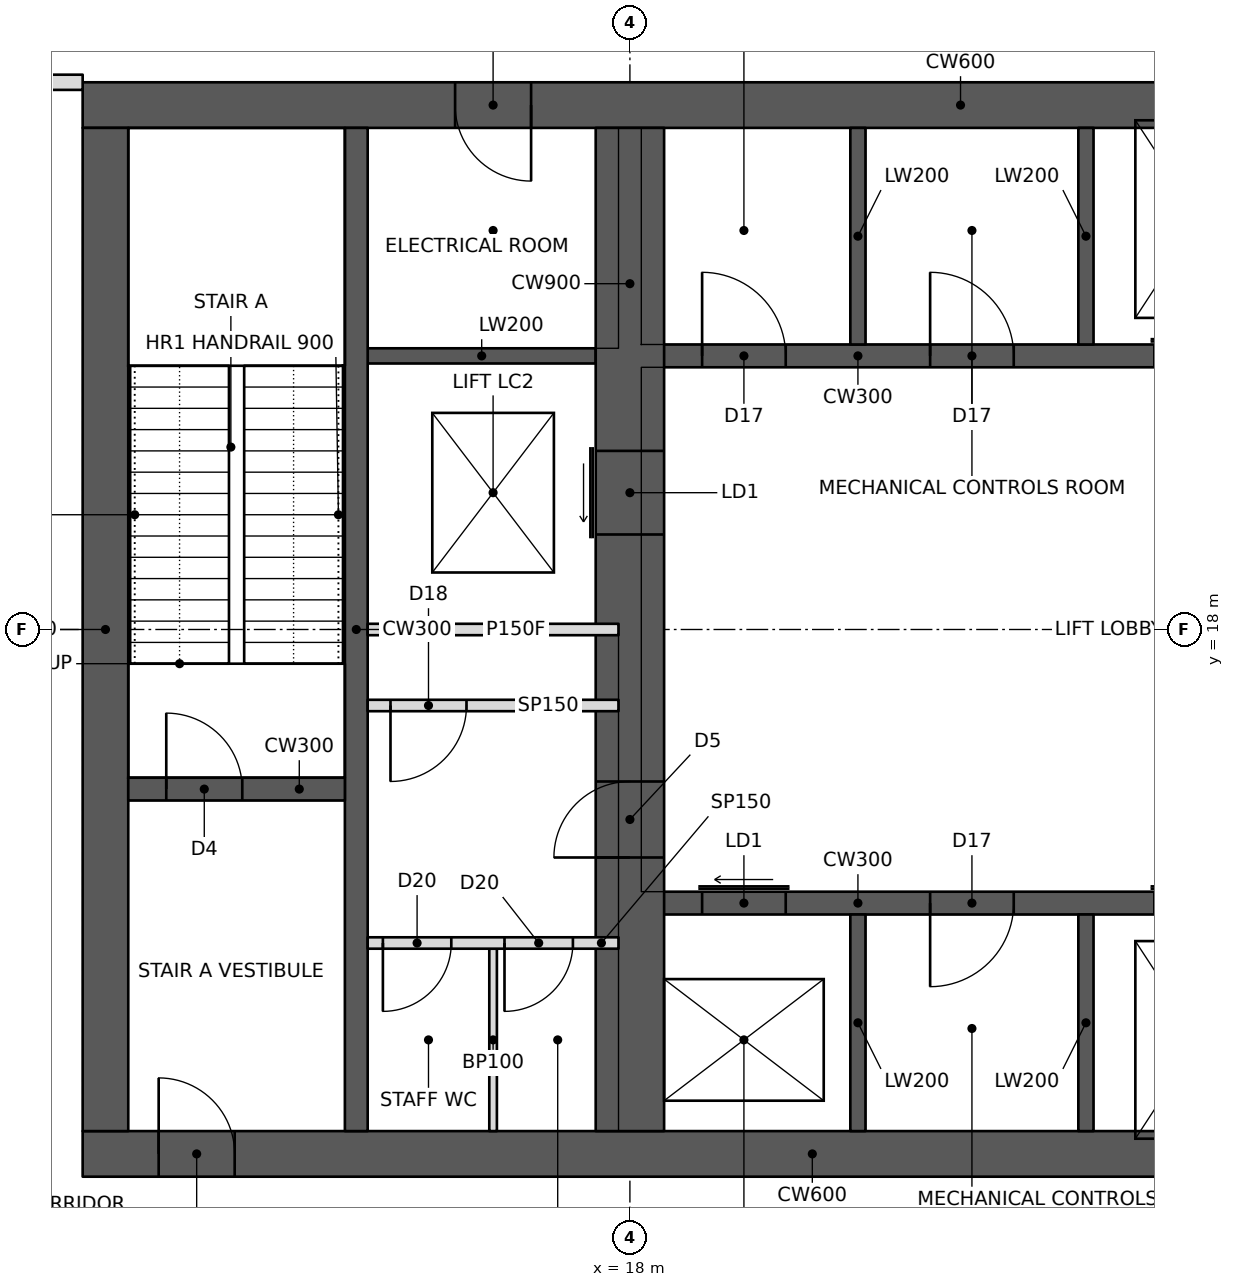
"""IFC4 building model, lengths in metres.
Left out: names, types, materials, properties, quantities, classifications, styles, units other than length and angle.
Written with IfcOpenShell. Run it as: python <this file> out.ifc"""

import sys

from ifc_helpers import new_model, si_unit, direction, frame, frame_2d, origin, place, context, subcontext, project, spatial, rectangle, extrude, element, fill, save


model = new_model("IFC4")
c1 = context("Model", 3, precision=1e-05, world=origin(), true_north=direction((0.0, 1.0)))
c2 = subcontext(c1, "Body", "Model", "MODEL_VIEW")
j1 = project(units=[si_unit("LENGTHUNIT", "METRE"), si_unit("PLANEANGLEUNIT", "RADIAN")], contexts=[c1])
p1 = place(None, origin())
s1 = spatial("IfcSite", under=j1, at=p1, CompositionType="ELEMENT")
p2 = place(p1, origin())
s2 = spatial("IfcBuilding", under=s1, at=p2, CompositionType="ELEMENT")
p3 = place(p2, frame((0.0, 0.0, 221.6)))
s3 = spatial("IfcBuildingStorey", under=s2, at=p3, CompositionType="ELEMENT", Elevation=221.6)
p4 = place(p3, frame((10.8, 11.1, 0.0), z_axis=(0.0, 0.0, 1.0), x_axis=(1.0, 0.0, 0.0)))
e1 = element("IfcWall", 1, at=p4, inside=s3, PredefinedType="SHEAR", context=c2, shape_type="SweptSolid", body=[
    extrude(rectangle(XDim=23.4, YDim=0.6, at=frame_2d((11.7, 0.0))), origin(), (0.0, 0.0, 1.0), 5.0),
])
p5 = place(p4, frame((1.0, 0.0, 0.0)))
e2 = element("IfcOpeningElement", 2, at=p5, cuts=e1, PredefinedType="OPENING", context=c2, shape_type="SweptSolid", body=[
    extrude(rectangle(XDim=1.0, YDim=2.1, at=frame_2d((0.5, 1.05))), frame((0.0, 0.31, 0.0), z_axis=(0.0, -1.0, 0.0), x_axis=(1.0, 0.0, 0.0)), (0.0, 0.0, 1.0), 0.62),
])
p6 = place(p4, frame((17.2, 0.0, 0.0)))
e3 = element("IfcOpeningElement", 3, at=p6, cuts=e1, PredefinedType="OPENING", context=c2, shape_type="SweptSolid", body=[
    extrude(rectangle(XDim=1.8, YDim=2.1, at=frame_2d((0.9, 1.05))), frame((0.0, 0.31, 0.0), z_axis=(0.0, -1.0, 0.0), x_axis=(1.0, 0.0, 0.0)), (0.0, 0.0, 1.0), 0.62),
])
p7 = place(p3, frame((10.8, 24.9, 0.0), z_axis=(0.0, 0.0, 1.0), x_axis=(1.0, 0.0, 0.0)))
e4 = element("IfcWall", 4, at=p7, inside=s3, PredefinedType="SHEAR", context=c2, shape_type="SweptSolid", body=[
    extrude(rectangle(XDim=23.4, YDim=0.6, at=frame_2d((11.7, 0.0))), origin(), (0.0, 0.0, 1.0), 5.0),
])
p8 = place(p7, frame((17.2, 0.0, 0.0)))
e5 = element("IfcOpeningElement", 5, at=p8, cuts=e4, PredefinedType="OPENING", context=c2, shape_type="SweptSolid", body=[
    extrude(rectangle(XDim=1.8, YDim=2.1, at=frame_2d((0.9, 1.05))), frame((0.0, 0.31, 0.0), z_axis=(0.0, -1.0, 0.0), x_axis=(1.0, 0.0, 0.0)), (0.0, 0.0, 1.0), 0.62),
])
p9 = place(p7, frame((21.1, 0.0, 0.0)))
e6 = element("IfcOpeningElement", 6, at=p9, cuts=e4, PredefinedType="OPENING", context=c2, shape_type="SweptSolid", body=[
    extrude(rectangle(XDim=1.0, YDim=2.1, at=frame_2d((0.5, 1.05))), frame((0.0, 0.31, 0.0), z_axis=(0.0, -1.0, 0.0), x_axis=(1.0, 0.0, 0.0)), (0.0, 0.0, 1.0), 0.62),
])
p10 = place(p7, frame((4.9, 0.0, 0.0)))
e7 = element("IfcOpeningElement", 7, at=p10, cuts=e4, PredefinedType="OPENING", context=c2, shape_type="SweptSolid", body=[
    extrude(rectangle(XDim=1.0, YDim=2.1, at=frame_2d((0.5, 1.05))), frame((0.0, 0.31, 0.0), z_axis=(0.0, -1.0, 0.0), x_axis=(1.0, 0.0, 0.0)), (0.0, 0.0, 1.0), 0.62),
])
p11 = place(p3, frame((11.1, 11.4, 0.0), z_axis=(0.0, 0.0, 1.0), x_axis=(0.0, 1.0, 0.0)))
e8 = element("IfcWall", 8, at=p11, inside=s3, PredefinedType="SHEAR", context=c2, shape_type="SweptSolid", body=[
    extrude(rectangle(XDim=13.2, YDim=0.6, at=frame_2d((6.6, 0.0))), origin(), (0.0, 0.0, 1.0), 5.0),
])
p12 = place(p3, frame((14.4, 11.4, 0.0), z_axis=(0.0, 0.0, 1.0), x_axis=(0.0, 1.0, 0.0)))
e9 = element("IfcWall", 9, at=p12, inside=s3, PredefinedType="SHEAR", context=c2, shape_type="SweptSolid", body=[
    extrude(rectangle(XDim=13.2, YDim=0.3, at=frame_2d((6.6, 0.0))), origin(), (0.0, 0.0, 1.0), 5.0),
])
p13 = place(p3, frame((11.4, 15.9, 0.0), z_axis=(0.0, 0.0, 1.0), x_axis=(1.0, 0.0, 0.0)))
e10 = element("IfcWall", 10, at=p13, inside=s3, PredefinedType="SHEAR", context=c2, shape_type="SweptSolid", body=[
    extrude(rectangle(XDim=2.85, YDim=0.3, at=frame_2d((1.425, 0.0))), origin(), (0.0, 0.0, 1.0), 5.0),
])
p14 = place(p13, frame((0.5, 0.0, 0.0)))
e11 = element("IfcOpeningElement", 11, at=p14, cuts=e10, PredefinedType="OPENING", context=c2, shape_type="SweptSolid", body=[
    extrude(rectangle(XDim=1.0, YDim=2.1, at=frame_2d((0.5, 1.05))), frame((0.0, 0.16, 0.0), z_axis=(0.0, -1.0, 0.0), x_axis=(1.0, 0.0, 0.0)), (0.0, 0.0, 1.0), 0.32),
])
p15 = place(p3, frame((18.0, 11.4, 0.0), z_axis=(0.0, 0.0, 1.0), x_axis=(0.0, 1.0, 0.0)))
e12 = element("IfcWall", 12, at=p15, inside=s3, PredefinedType="SHEAR", context=c2, shape_type="SweptSolid", body=[
    extrude(rectangle(XDim=13.2, YDim=0.9, at=frame_2d((6.6, 0.0))), origin(), (0.0, 0.0, 1.0), 5.0),
])
p16 = place(p15, frame((3.6, 0.0, 0.0)))
e13 = element("IfcOpeningElement", 13, at=p16, cuts=e12, PredefinedType="OPENING", context=c2, shape_type="SweptSolid", body=[
    extrude(rectangle(XDim=1.0, YDim=2.1, at=frame_2d((0.5, 1.05))), frame((0.0, 0.46, 0.0), z_axis=(0.0, -1.0, 0.0), x_axis=(1.0, 0.0, 0.0)), (0.0, 0.0, 1.0), 0.92),
])
p17 = place(p15, frame((7.85, 0.0, 0.0)))
e14 = element("IfcOpeningElement", 14, at=p17, cuts=e12, PredefinedType="OPENING", context=c2, shape_type="SweptSolid", body=[
    extrude(rectangle(XDim=1.1, YDim=2.1, at=frame_2d((0.55, 1.05))), frame((0.0, 0.46, 0.0), z_axis=(0.0, -1.0, 0.0), x_axis=(1.0, 0.0, 0.0)), (0.0, 0.0, 1.0), 0.92),
])
p18 = place(p3, frame((14.55, 18.0, 0.0), z_axis=(0.0, 0.0, 1.0), x_axis=(1.0, 0.0, 0.0)))
e15 = element("IfcWall", 15, at=p18, inside=s3, PredefinedType="PARTITIONING", context=c2, shape_type="SweptSolid", body=[
    extrude(rectangle(XDim=3.3, YDim=0.15, at=frame_2d((1.65, 0.0))), origin(), (0.0, 0.0, 1.0), 4.8),
])
p19 = place(p3, frame((18.15, 14.4, 0.0), z_axis=(0.0, 0.0, 1.0), x_axis=(1.0, 0.0, 0.0)))
e16 = element("IfcWall", 16, at=p19, inside=s3, PredefinedType="SHEAR", context=c2, shape_type="SweptSolid", body=[
    extrude(rectangle(XDim=9.0, YDim=0.3, at=frame_2d((4.5, 0.0))), origin(), (0.0, 0.0, 1.0), 5.0),
])
p20 = place(p19, frame((0.8, 0.0, 0.0)))
e17 = element("IfcOpeningElement", 17, at=p20, cuts=e16, PredefinedType="OPENING", context=c2, shape_type="SweptSolid", body=[
    extrude(rectangle(XDim=1.1, YDim=2.1, at=frame_2d((0.55, 1.05))), frame((0.0, 0.16, 0.0), z_axis=(0.0, -1.0, 0.0), x_axis=(1.0, 0.0, 0.0)), (0.0, 0.0, 1.0), 0.32),
])
p21 = place(p19, frame((6.75, 0.0, 0.0)))
e18 = element("IfcOpeningElement", 18, at=p21, cuts=e16, PredefinedType="OPENING", context=c2, shape_type="SweptSolid", body=[
    extrude(rectangle(XDim=1.2, YDim=2.1, at=frame_2d((0.6, 1.05))), frame((0.0, 0.16, 0.0), z_axis=(0.0, -1.0, 0.0), x_axis=(1.0, 0.0, 0.0)), (0.0, 0.0, 1.0), 0.32),
])
p22 = place(p19, frame((3.8, 0.0, 0.0)))
e19 = element("IfcOpeningElement", 19, at=p22, cuts=e16, PredefinedType="OPENING", context=c2, shape_type="SweptSolid", body=[
    extrude(rectangle(XDim=1.1, YDim=2.1, at=frame_2d((0.55, 1.05))), frame((0.0, 0.16, 0.0), z_axis=(0.0, -1.0, 0.0), x_axis=(1.0, 0.0, 0.0)), (0.0, 0.0, 1.0), 0.32),
])
for number, where, z_axis, x_axis in (
    (20, (21.0, 11.4, 0.0), (0.0, 0.0, 1.0), (0.0, 1.0, 0.0)),
    (21, (24.0, 11.4, 0.0), (0.0, 0.0, 1.0), (0.0, 1.0, 0.0)),
):
    element("IfcWall", number, at=place(p3, frame(where, z_axis=z_axis, x_axis=x_axis)), inside=s3, PredefinedType="SHEAR", context=c2, shape_type="SweptSolid", body=[
        extrude(rectangle(XDim=2.85, YDim=0.2, at=frame_2d((1.425, 0.0))), origin(), (0.0, 0.0, 1.0), 5.0),
    ])
p23 = place(p3, frame((18.15, 21.6, 0.0), z_axis=(0.0, 0.0, 1.0), x_axis=(1.0, 0.0, 0.0)))
e22 = element("IfcWall", 22, at=p23, inside=s3, PredefinedType="SHEAR", context=c2, shape_type="SweptSolid", body=[
    extrude(rectangle(XDim=9.0, YDim=0.3, at=frame_2d((4.5, 0.0))), origin(), (0.0, 0.0, 1.0), 5.0),
])
p24 = place(p23, frame((6.75, 0.0, 0.0)))
e23 = element("IfcOpeningElement", 23, at=p24, cuts=e22, PredefinedType="OPENING", context=c2, shape_type="SweptSolid", body=[
    extrude(rectangle(XDim=1.2, YDim=2.1, at=frame_2d((0.6, 1.05))), frame((0.0, 0.16, 0.0), z_axis=(0.0, -1.0, 0.0), x_axis=(1.0, 0.0, 0.0)), (0.0, 0.0, 1.0), 0.32),
])
p25 = place(p23, frame((0.8, 0.0, 0.0)))
e24 = element("IfcOpeningElement", 24, at=p25, cuts=e22, PredefinedType="OPENING", context=c2, shape_type="SweptSolid", body=[
    extrude(rectangle(XDim=1.1, YDim=2.1, at=frame_2d((0.55, 1.05))), frame((0.0, 0.16, 0.0), z_axis=(0.0, -1.0, 0.0), x_axis=(1.0, 0.0, 0.0)), (0.0, 0.0, 1.0), 0.32),
])
p26 = place(p23, frame((3.8, 0.0, 0.0)))
e25 = element("IfcOpeningElement", 25, at=p26, cuts=e22, PredefinedType="OPENING", context=c2, shape_type="SweptSolid", body=[
    extrude(rectangle(XDim=1.1, YDim=2.1, at=frame_2d((0.55, 1.05))), frame((0.0, 0.16, 0.0), z_axis=(0.0, -1.0, 0.0), x_axis=(1.0, 0.0, 0.0)), (0.0, 0.0, 1.0), 0.32),
])
for number, where, z_axis, x_axis in (
    (26, (21.0, 21.75, 0.0), (0.0, 0.0, 1.0), (0.0, 1.0, 0.0)),
    (27, (24.0, 21.75, 0.0), (0.0, 0.0, 1.0), (0.0, 1.0, 0.0)),
):
    element("IfcWall", number, at=place(p3, frame(where, z_axis=z_axis, x_axis=x_axis)), inside=s3, PredefinedType="SHEAR", context=c2, shape_type="SweptSolid", body=[
        extrude(rectangle(XDim=2.85, YDim=0.2, at=frame_2d((1.425, 0.0))), origin(), (0.0, 0.0, 1.0), 5.0),
    ])
p27 = place(p3, frame((14.55, 21.6, 0.0), z_axis=(0.0, 0.0, 1.0), x_axis=(1.0, 0.0, 0.0)))
e28 = element("IfcWall", 28, at=p27, inside=s3, PredefinedType="SHEAR", context=c2, shape_type="SweptSolid", body=[
    extrude(rectangle(XDim=3.0, YDim=0.2, at=frame_2d((1.5, 0.0))), origin(), (0.0, 0.0, 1.0), 5.0),
])
p28 = place(p3, frame((9.1, 25.2, 0.0), z_axis=(0.0, 0.0, 1.0), x_axis=(1.0, 0.0, 0.0)))
e29 = element("IfcWall", 29, at=p28, inside=s3, PredefinedType="PARTITIONING", context=c2, shape_type="SweptSolid", body=[
    extrude(rectangle(XDim=1.7, YDim=0.2, at=frame_2d((0.85, 0.0))), origin(), (0.0, 0.0, 1.0), 4.004),
])
p29 = place(p3, frame((14.55, 17.0, 0.0), z_axis=(0.0, 0.0, 1.0), x_axis=(1.0, 0.0, 0.0)))
e30 = element("IfcWall", 30, at=p29, inside=s3, PredefinedType="PARTITIONING", context=c2, shape_type="SweptSolid", body=[
    extrude(rectangle(XDim=3.3, YDim=0.15, at=frame_2d((1.65, 0.0))), origin(), (0.0, 0.0, 1.0), 4.8),
])
p30 = place(p29, frame((0.3, 0.0, 0.0)))
e31 = element("IfcOpeningElement", 31, at=p30, cuts=e30, PredefinedType="OPENING", context=c2, shape_type="SweptSolid", body=[
    extrude(rectangle(XDim=1.0, YDim=2.1, at=frame_2d((0.5, 1.05))), frame((0.0, 0.085, 0.0), z_axis=(0.0, -1.0, 0.0), x_axis=(1.0, 0.0, 0.0)), (0.0, 0.0, 1.0), 0.17),
])
p31 = place(p3, frame((14.55, 13.875, 0.0), z_axis=(0.0, 0.0, 1.0), x_axis=(1.0, 0.0, 0.0)))
e32 = element("IfcWall", 32, at=p31, inside=s3, PredefinedType="PARTITIONING", context=c2, shape_type="SweptSolid", body=[
    extrude(rectangle(XDim=3.3, YDim=0.15, at=frame_2d((1.65, 0.0))), origin(), (0.0, 0.0, 1.0), 4.8),
])
p32 = place(p31, frame((0.2, 0.0, 0.0)))
e33 = element("IfcOpeningElement", 33, at=p32, cuts=e32, PredefinedType="OPENING", context=c2, shape_type="SweptSolid", body=[
    extrude(rectangle(XDim=0.9, YDim=2.1, at=frame_2d((0.45, 1.05))), frame((0.0, 0.085, 0.0), z_axis=(0.0, -1.0, 0.0), x_axis=(1.0, 0.0, 0.0)), (0.0, 0.0, 1.0), 0.17),
])
p33 = place(p31, frame((1.8, 0.0, 0.0)))
e34 = element("IfcOpeningElement", 34, at=p33, cuts=e32, PredefinedType="OPENING", context=c2, shape_type="SweptSolid", body=[
    extrude(rectangle(XDim=0.9, YDim=2.1, at=frame_2d((0.45, 1.05))), frame((0.0, 0.085, 0.0), z_axis=(0.0, -1.0, 0.0), x_axis=(1.0, 0.0, 0.0)), (0.0, 0.0, 1.0), 0.17),
])
p34 = place(p3, frame((16.2, 11.4, 0.0), z_axis=(0.0, 0.0, 1.0), x_axis=(0.0, 1.0, 0.0)))
e35 = element("IfcWall", 35, at=p34, inside=s3, PredefinedType="PARTITIONING", context=c2, shape_type="SweptSolid", body=[
    extrude(rectangle(XDim=2.4, YDim=0.1, at=frame_2d((1.2, 0.0))), origin(), (0.0, 0.0, 1.0), 4.8),
])
p35 = place(p30, frame((1.0, 0.0, 0.0), z_axis=(0.0, 0.0, 1.0), x_axis=(-1.0, 0.0, 0.0)))
e36 = element("IfcDoor", 36, at=p35, inside=s3, OperationType="SINGLE_SWING_RIGHT", PredefinedType="DOOR", context=c2, shape_type="SweptSolid", body=[
    extrude(rectangle(XDim=1.0, YDim=2.1, at=frame_2d((0.5, 1.05))), frame((0.0, 0.025, 0.0), z_axis=(0.0, -1.0, 0.0), x_axis=(1.0, 0.0, 0.0)), (0.0, 0.0, 1.0), 0.05),
])
fill(e31, e36)
p36 = place(p32, frame((0.9, 0.0, 0.0), z_axis=(0.0, 0.0, 1.0), x_axis=(-1.0, 0.0, 0.0)))
e37 = element("IfcDoor", 37, at=p36, inside=s3, OperationType="SINGLE_SWING_RIGHT", PredefinedType="DOOR", context=c2, shape_type="SweptSolid", body=[
    extrude(rectangle(XDim=0.9, YDim=2.1, at=frame_2d((0.45, 1.05))), frame((0.0, 0.025, 0.0), z_axis=(0.0, -1.0, 0.0), x_axis=(1.0, 0.0, 0.0)), (0.0, 0.0, 1.0), 0.05),
])
fill(e33, e37)
p37 = place(p33, frame((0.9, 0.0, 0.0), z_axis=(0.0, 0.0, 1.0), x_axis=(-1.0, 0.0, 0.0)))
e38 = element("IfcDoor", 38, at=p37, inside=s3, OperationType="SINGLE_SWING_RIGHT", PredefinedType="DOOR", context=c2, shape_type="SweptSolid", body=[
    extrude(rectangle(XDim=0.9, YDim=2.1, at=frame_2d((0.45, 1.05))), frame((0.0, 0.025, 0.0), z_axis=(0.0, -1.0, 0.0), x_axis=(1.0, 0.0, 0.0)), (0.0, 0.0, 1.0), 0.05),
])
fill(e34, e38)
p38 = place(p5, origin())
e39 = element("IfcDoor", 39, at=p38, inside=s3, OperationType="SINGLE_SWING_LEFT", PredefinedType="DOOR", context=c2, shape_type="SweptSolid", body=[
    extrude(rectangle(XDim=1.0, YDim=2.1, at=frame_2d((0.5, 1.05))), frame((0.0, 0.025, 0.0), z_axis=(0.0, -1.0, 0.0), x_axis=(1.0, 0.0, 0.0)), (0.0, 0.0, 1.0), 0.05),
])
fill(e2, e39)
p39 = place(p14, origin())
e40 = element("IfcDoor", 40, at=p39, inside=s3, OperationType="SINGLE_SWING_LEFT", PredefinedType="DOOR", context=c2, shape_type="SweptSolid", body=[
    extrude(rectangle(XDim=1.0, YDim=2.1, at=frame_2d((0.5, 1.05))), frame((0.0, 0.025, 0.0), z_axis=(0.0, -1.0, 0.0), x_axis=(1.0, 0.0, 0.0)), (0.0, 0.0, 1.0), 0.05),
])
fill(e11, e40)
p40 = place(p16, origin())
e41 = element("IfcDoor", 41, at=p40, inside=s3, OperationType="SINGLE_SWING_LEFT", PredefinedType="DOOR", context=c2, shape_type="SweptSolid", body=[
    extrude(rectangle(XDim=1.0, YDim=2.1, at=frame_2d((0.5, 1.05))), frame((0.0, 0.025, 0.0), z_axis=(0.0, -1.0, 0.0), x_axis=(1.0, 0.0, 0.0)), (0.0, 0.0, 1.0), 0.05),
])
fill(e13, e41)
p41 = place(p10, frame((1.0, 0.0, 0.0), z_axis=(0.0, 0.0, 1.0), x_axis=(-1.0, 0.0, 0.0)))
e42 = element("IfcDoor", 42, at=p41, inside=s3, OperationType="SINGLE_SWING_LEFT", PredefinedType="DOOR", context=c2, shape_type="SweptSolid", body=[
    extrude(rectangle(XDim=1.0, YDim=2.1, at=frame_2d((0.5, 1.05))), frame((0.0, 0.025, 0.0), z_axis=(0.0, -1.0, 0.0), x_axis=(1.0, 0.0, 0.0)), (0.0, 0.0, 1.0), 0.05),
])
fill(e7, e42)
p42 = place(p20, origin())
e43 = element("IfcDoor", 43, at=p42, inside=s3, OperationType="SLIDING_TO_LEFT", PredefinedType="DOOR", context=c2, shape_type="SweptSolid", body=[
    extrude(rectangle(XDim=1.1, YDim=2.1, at=frame_2d((0.55, 1.05))), frame((0.0, 0.025, 0.0), z_axis=(0.0, -1.0, 0.0), x_axis=(1.0, 0.0, 0.0)), (0.0, 0.0, 1.0), 0.05),
])
fill(e17, e43)
p43 = place(p17, origin())
e44 = element("IfcDoor", 44, at=p43, inside=s3, OperationType="SLIDING_TO_LEFT", PredefinedType="DOOR", context=c2, shape_type="SweptSolid", body=[
    extrude(rectangle(XDim=1.1, YDim=2.1, at=frame_2d((0.55, 1.05))), frame((0.0, 0.025, 0.0), z_axis=(0.0, -1.0, 0.0), x_axis=(1.0, 0.0, 0.0)), (0.0, 0.0, 1.0), 0.05),
])
fill(e14, e44)
p44 = place(p25, origin())
e45 = element("IfcDoor", 45, at=p44, inside=s3, OperationType="SINGLE_SWING_LEFT", PredefinedType="DOOR", context=c2, shape_type="SweptSolid", body=[
    extrude(rectangle(XDim=1.1, YDim=2.1, at=frame_2d((0.55, 1.05))), frame((0.0, 0.025, 0.0), z_axis=(0.0, -1.0, 0.0), x_axis=(1.0, 0.0, 0.0)), (0.0, 0.0, 1.0), 0.05),
])
fill(e24, e45)
p45 = place(p26, origin())
e46 = element("IfcDoor", 46, at=p45, inside=s3, OperationType="SINGLE_SWING_LEFT", PredefinedType="DOOR", context=c2, shape_type="SweptSolid", body=[
    extrude(rectangle(XDim=1.1, YDim=2.1, at=frame_2d((0.55, 1.05))), frame((0.0, 0.025, 0.0), z_axis=(0.0, -1.0, 0.0), x_axis=(1.0, 0.0, 0.0)), (0.0, 0.0, 1.0), 0.05),
])
fill(e25, e46)
p46 = place(p22, frame((1.1, 0.0, 0.0), z_axis=(0.0, 0.0, 1.0), x_axis=(-1.0, 0.0, 0.0)))
e47 = element("IfcDoor", 47, at=p46, inside=s3, OperationType="SINGLE_SWING_RIGHT", PredefinedType="DOOR", context=c2, shape_type="SweptSolid", body=[
    extrude(rectangle(XDim=1.1, YDim=2.1, at=frame_2d((0.55, 1.05))), frame((0.0, 0.025, 0.0), z_axis=(0.0, -1.0, 0.0), x_axis=(1.0, 0.0, 0.0)), (0.0, 0.0, 1.0), 0.05),
])
fill(e19, e47)
save(model, sys.argv[1])
